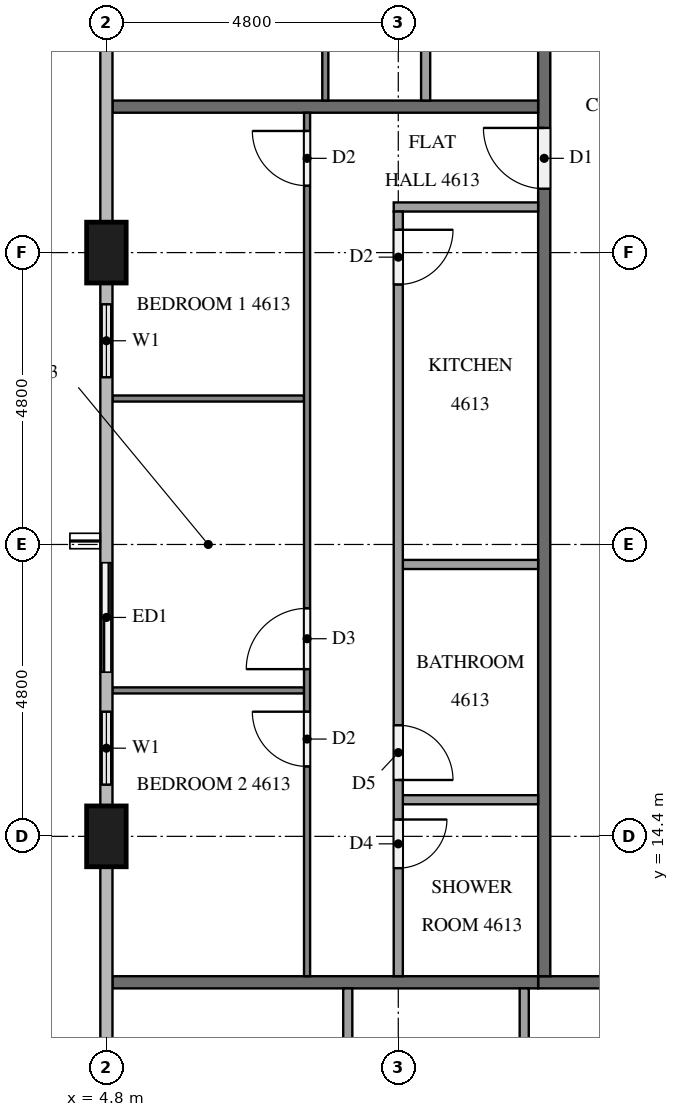
"""IFC4 building model, lengths in metres.
Left out: names, types, materials, properties, quantities, classifications, styles, units other than length and angle.
Written with IfcOpenShell. Run it as: python <this file> out.ifc"""

import sys

from ifc_helpers import new_model, si_unit, direction, frame, frame_2d, origin, origin_2d, place, context, subcontext, project, spatial, rectangle, extrude, element, fill, save


model = new_model("IFC4")
c1 = context("Model", 3, precision=1e-05, world=origin(), true_north=direction((0.0, 1.0)))
c2 = subcontext(c1, "Body", "Model", "MODEL_VIEW")
j1 = project(units=[si_unit("LENGTHUNIT", "METRE"), si_unit("PLANEANGLEUNIT", "RADIAN")], contexts=[c1])
p1 = place(None, origin())
s1 = spatial("IfcSite", under=j1, at=p1, CompositionType="ELEMENT")
p2 = place(p1, origin())
s2 = spatial("IfcBuilding", under=s1, at=p2, CompositionType="ELEMENT")
p3 = place(p2, frame((0.0, 0.0, 178.9)))
s3 = spatial("IfcBuildingStorey", under=s2, at=p3, CompositionType="ELEMENT", Elevation=178.9)
for number, where, z_axis, x_axis in (
    (1, (4.8, 24.0, 0.0), (0.0, 0.0, 1.0), (0.0, 1.0, 0.0)),
    (2, (4.8, 14.4, 0.0), (0.0, 0.0, 1.0), (0.0, 1.0, 0.0)),
):
    element("IfcColumn", number, at=place(p3, frame(where, z_axis=z_axis, x_axis=x_axis)), inside=s3, PredefinedType="COLUMN", context=c2, shape_type="SweptSolid", body=[
        extrude(rectangle(XDim=1.0, YDim=0.65, at=origin_2d()), origin(), (0.0, 0.0, 1.0), 3.2),
    ])
p4 = place(p3, frame((4.8, 23.5, 0.0), z_axis=(0.0, 0.0, 1.0), x_axis=(0.0, -1.0, 0.0)))
e3 = element("IfcWall", 3, at=p4, inside=s3, PredefinedType="SOLIDWALL", context=c2, shape_type="SweptSolid", body=[
    extrude(rectangle(XDim=1.9, YDim=0.15, at=frame_2d((0.95, 0.0))), origin(), (0.0, 0.0, 1.0), 3.2),
])
p5 = place(p4, frame((0.35, 0.0, 0.9)))
e4 = element("IfcOpeningElement", 4, at=p5, cuts=e3, PredefinedType="OPENING", context=c2, shape_type="SweptSolid", body=[
    extrude(rectangle(XDim=1.2, YDim=1.4, at=frame_2d((0.6, 0.7))), frame((0.0, 0.085, 0.0), z_axis=(0.0, -1.0, 0.0), x_axis=(1.0, 0.0, 0.0)), (0.0, 0.0, 1.0), 0.17),
])
p6 = place(p3, frame((4.8, 19.2, 0.0), z_axis=(0.0, 0.0, 1.0), x_axis=(0.0, -1.0, 0.0)))
e5 = element("IfcWall", 5, at=p6, inside=s3, PredefinedType="SOLIDWALL", context=c2, shape_type="SweptSolid", body=[
    extrude(rectangle(XDim=4.3, YDim=0.15, at=frame_2d((2.15, 0.0))), origin(), (0.0, 0.0, 1.0), 3.2),
])
p7 = place(p6, frame((0.3, 0.0, 0.0)))
e6 = element("IfcOpeningElement", 6, at=p7, cuts=e5, PredefinedType="OPENING", context=c2, shape_type="SweptSolid", body=[
    extrude(rectangle(XDim=1.8, YDim=2.4, at=frame_2d((0.9, 1.2))), frame((0.0, 0.085, 0.0), z_axis=(0.0, -1.0, 0.0), x_axis=(1.0, 0.0, 0.0)), (0.0, 0.0, 1.0), 0.17),
])
p8 = place(p6, frame((2.75, 0.0, 0.9)))
e7 = element("IfcOpeningElement", 7, at=p8, cuts=e5, PredefinedType="OPENING", context=c2, shape_type="SweptSolid", body=[
    extrude(rectangle(XDim=1.2, YDim=1.4, at=frame_2d((0.6, 0.7))), frame((0.0, 0.085, 0.0), z_axis=(0.0, -1.0, 0.0), x_axis=(1.0, 0.0, 0.0)), (0.0, 0.0, 1.0), 0.17),
])
p9 = place(p3, frame((50.5, 12.0, 0.0), z_axis=(0.0, 0.0, 1.0), x_axis=(-1.0, 0.0, 0.0)))
e8 = element("IfcWall", 8, at=p9, inside=s3, PredefinedType="PARTITIONING", context=c2, shape_type="SweptSolid", body=[
    extrude(rectangle(XDim=38.6, YDim=0.2, at=frame_2d((19.3, 0.0))), origin(), (0.0, 0.0, 1.0), 3.2),
])
p10 = place(p9, frame((31.65, 0.0, 0.0)))
e9 = element("IfcOpeningElement", 9, at=p10, cuts=e8, PredefinedType="OPENING", context=c2, shape_type="SweptSolid", body=[
    extrude(rectangle(XDim=1.0, YDim=2.1, at=frame_2d((0.5, 1.05))), frame((0.0, 0.11, 0.0), z_axis=(0.0, -1.0, 0.0), x_axis=(1.0, 0.0, 0.0)), (0.0, 0.0, 1.0), 0.22),
])
p11 = place(p9, frame((17.25, 0.0, 0.0)))
e10 = element("IfcOpeningElement", 10, at=p11, cuts=e8, PredefinedType="OPENING", context=c2, shape_type="SweptSolid", body=[
    extrude(rectangle(XDim=1.0, YDim=2.1, at=frame_2d((0.5, 1.05))), frame((0.0, 0.11, 0.0), z_axis=(0.0, -1.0, 0.0), x_axis=(1.0, 0.0, 0.0)), (0.0, 0.0, 1.0), 0.22),
])
p12 = place(p9, frame((7.65, 0.0, 0.0)))
e11 = element("IfcOpeningElement", 11, at=p12, cuts=e8, PredefinedType="OPENING", context=c2, shape_type="SweptSolid", body=[
    extrude(rectangle(XDim=1.0, YDim=2.1, at=frame_2d((0.5, 1.05))), frame((0.0, 0.11, 0.0), z_axis=(0.0, -1.0, 0.0), x_axis=(1.0, 0.0, 0.0)), (0.0, 0.0, 1.0), 0.22),
])
p13 = place(p9, frame((5.9, 0.0, 0.0)))
e12 = element("IfcOpeningElement", 12, at=p13, cuts=e8, PredefinedType="OPENING", context=c2, shape_type="SweptSolid", body=[
    extrude(rectangle(XDim=1.1, YDim=2.1, at=frame_2d((0.55, 1.05))), frame((0.0, 0.11, 0.0), z_axis=(0.0, -1.0, 0.0), x_axis=(1.0, 0.0, 0.0)), (0.0, 0.0, 1.0), 0.22),
])
p14 = place(p3, frame((12.0, 12.1, 0.0), z_axis=(0.0, 0.0, 1.0), x_axis=(0.0, 1.0, 0.0)))
e13 = element("IfcWall", 13, at=p14, inside=s3, PredefinedType="PARTITIONING", context=c2, shape_type="SweptSolid", body=[
    extrude(rectangle(XDim=28.6, YDim=0.2, at=frame_2d((14.3, 0.0))), origin(), (0.0, 0.0, 1.0), 3.2),
])
p15 = place(p14, frame((26.65, 0.0, 0.0)))
e14 = element("IfcOpeningElement", 14, at=p15, cuts=e13, PredefinedType="OPENING", context=c2, shape_type="SweptSolid", body=[
    extrude(rectangle(XDim=1.0, YDim=2.1, at=frame_2d((0.5, 1.05))), frame((0.0, 0.11, 0.0), z_axis=(0.0, -1.0, 0.0), x_axis=(1.0, 0.0, 0.0)), (0.0, 0.0, 1.0), 0.22),
])
p16 = place(p14, frame((24.95, 0.0, 0.0)))
e15 = element("IfcOpeningElement", 15, at=p16, cuts=e13, PredefinedType="OPENING", context=c2, shape_type="SweptSolid", body=[
    extrude(rectangle(XDim=1.0, YDim=2.1, at=frame_2d((0.5, 1.05))), frame((0.0, 0.11, 0.0), z_axis=(0.0, -1.0, 0.0), x_axis=(1.0, 0.0, 0.0)), (0.0, 0.0, 1.0), 0.22),
])
p17 = place(p14, frame((12.95, 0.0, 0.0)))
e16 = element("IfcOpeningElement", 16, at=p17, cuts=e13, PredefinedType="OPENING", context=c2, shape_type="SweptSolid", body=[
    extrude(rectangle(XDim=1.0, YDim=2.1, at=frame_2d((0.5, 1.05))), frame((0.0, 0.11, 0.0), z_axis=(0.0, -1.0, 0.0), x_axis=(1.0, 0.0, 0.0)), (0.0, 0.0, 1.0), 0.22),
])
for number, where, z_axis, x_axis in (
    (17, (4.9, 12.0, 0.0), (0.0, 0.0, 1.0), (1.0, 0.0, 0.0)),
    (18, (4.9, 26.4, 0.0), (0.0, 0.0, 1.0), (1.0, 0.0, 0.0)),
):
    element("IfcWall", number, at=place(p3, frame(where, z_axis=z_axis, x_axis=x_axis)), inside=s3, PredefinedType="PARTITIONING", context=c2, shape_type="SweptSolid", body=[
        extrude(rectangle(XDim=7.0, YDim=0.2, at=frame_2d((3.5, 0.0))), origin(), (0.0, 0.0, 1.0), 3.2),
    ])
for number, where, z_axis, x_axis in (
    (19, (11.671, 11.9, 0.0), (0.0, 0.0, 1.0), (0.0, -1.0, 0.0)),
    (20, (8.769, 11.9, 0.0), (0.0, 0.0, 1.0), (0.0, -1.0, 0.0)),
):
    element("IfcWall", number, at=place(p3, frame(where, z_axis=z_axis, x_axis=x_axis)), inside=s3, PredefinedType="PARTITIONING", context=c2, shape_type="SweptSolid", body=[
        extrude(rectangle(XDim=4.325, YDim=0.15, at=frame_2d((2.163, 0.0))), origin(), (0.0, 0.0, 1.0), 3.2),
    ])
p18 = place(p3, frame((8.4, 26.5, 0.0), z_axis=(0.0, 0.0, 1.0), x_axis=(0.0, 1.0, 0.0)))
e21 = element("IfcWall", 21, at=p18, inside=s3, PredefinedType="PARTITIONING", context=c2, shape_type="SweptSolid", body=[
    extrude(rectangle(XDim=11.8, YDim=0.1, at=frame_2d((5.9, 0.0))), origin(), (0.0, 0.0, 1.0), 3.2),
])
p19 = place(p18, frame((5.05, 0.0, 0.0)))
e22 = element("IfcOpeningElement", 22, at=p19, cuts=e21, PredefinedType="OPENING", context=c2, shape_type="SweptSolid", body=[
    extrude(rectangle(XDim=1.0, YDim=2.1, at=frame_2d((0.5, 1.05))), frame((0.0, 0.06, 0.0), z_axis=(0.0, -1.0, 0.0), x_axis=(1.0, 0.0, 0.0)), (0.0, 0.0, 1.0), 0.12),
])
p20 = place(p18, frame((3.45, 0.0, 0.0)))
e23 = element("IfcOpeningElement", 23, at=p20, cuts=e21, PredefinedType="OPENING", context=c2, shape_type="SweptSolid", body=[
    extrude(rectangle(XDim=0.9, YDim=2.1, at=frame_2d((0.45, 1.05))), frame((0.0, 0.06, 0.0), z_axis=(0.0, -1.0, 0.0), x_axis=(1.0, 0.0, 0.0)), (0.0, 0.0, 1.0), 0.12),
])
p21 = place(p3, frame((10.05, 36.675, 0.0), z_axis=(0.0, 0.0, 1.0), x_axis=(0.0, -1.0, 0.0)))
e24 = element("IfcWall", 24, at=p21, inside=s3, PredefinedType="PARTITIONING", context=c2, shape_type="SweptSolid", body=[
    extrude(rectangle(XDim=10.175, YDim=0.15, at=frame_2d((5.087, 0.0))), origin(), (0.0, 0.0, 1.0), 3.2),
])
p22 = place(p21, frame((4.88, 0.0, 0.0)))
e25 = element("IfcOpeningElement", 25, at=p22, cuts=e24, PredefinedType="OPENING", context=c2, shape_type="SweptSolid", body=[
    extrude(rectangle(XDim=0.9, YDim=2.1, at=frame_2d((0.45, 1.05))), frame((0.0, 0.085, 0.0), z_axis=(0.0, -1.0, 0.0), x_axis=(1.0, 0.0, 0.0)), (0.0, 0.0, 1.0), 0.17),
])
p23 = place(p21, frame((6.43, 0.0, 0.0)))
e26 = element("IfcOpeningElement", 26, at=p23, cuts=e24, PredefinedType="OPENING", context=c2, shape_type="SweptSolid", body=[
    extrude(rectangle(XDim=0.8, YDim=2.1, at=frame_2d((0.4, 1.05))), frame((0.0, 0.085, 0.0), z_axis=(0.0, -1.0, 0.0), x_axis=(1.0, 0.0, 0.0)), (0.0, 0.0, 1.0), 0.17),
])
for number, where, z_axis, x_axis in (
    (27, (8.05, 21.6, 0.0), (0.0, 0.0, 1.0), (-1.0, 0.0, 0.0)),
    (28, (8.05, 16.8, 0.0), (0.0, 0.0, 1.0), (-1.0, 0.0, 0.0)),
):
    element("IfcWall", number, at=place(p3, frame(where, z_axis=z_axis, x_axis=x_axis)), inside=s3, PredefinedType="PARTITIONING", context=c2, shape_type="SweptSolid", body=[
        extrude(rectangle(XDim=3.15, YDim=0.1, at=frame_2d((1.575, 0.0))), origin(), (0.0, 0.0, 1.0), 3.2),
    ])
p24 = place(p3, frame((8.1, 12.1, 0.0), z_axis=(0.0, 0.0, 1.0), x_axis=(0.0, 1.0, 0.0)))
e29 = element("IfcWall", 29, at=p24, inside=s3, PredefinedType="PARTITIONING", context=c2, shape_type="SweptSolid", body=[
    extrude(rectangle(XDim=14.2, YDim=0.1, at=frame_2d((7.1, 0.0))), origin(), (0.0, 0.0, 1.0), 3.2),
])
p25 = place(p24, frame((13.0, 0.0, 0.0)))
e30 = element("IfcOpeningElement", 30, at=p25, cuts=e29, PredefinedType="OPENING", context=c2, shape_type="SweptSolid", body=[
    extrude(rectangle(XDim=0.9, YDim=2.1, at=frame_2d((0.45, 1.05))), frame((0.0, 0.06, 0.0), z_axis=(0.0, -1.0, 0.0), x_axis=(1.0, 0.0, 0.0)), (0.0, 0.0, 1.0), 0.12),
])
p26 = place(p24, frame((5.05, 0.0, 0.0)))
e31 = element("IfcOpeningElement", 31, at=p26, cuts=e29, PredefinedType="OPENING", context=c2, shape_type="SweptSolid", body=[
    extrude(rectangle(XDim=1.0, YDim=2.1, at=frame_2d((0.5, 1.05))), frame((0.0, 0.06, 0.0), z_axis=(0.0, -1.0, 0.0), x_axis=(1.0, 0.0, 0.0)), (0.0, 0.0, 1.0), 0.12),
])
p27 = place(p24, frame((3.45, 0.0, 0.0)))
e32 = element("IfcOpeningElement", 32, at=p27, cuts=e29, PredefinedType="OPENING", context=c2, shape_type="SweptSolid", body=[
    extrude(rectangle(XDim=0.9, YDim=2.1, at=frame_2d((0.45, 1.05))), frame((0.0, 0.06, 0.0), z_axis=(0.0, -1.0, 0.0), x_axis=(1.0, 0.0, 0.0)), (0.0, 0.0, 1.0), 0.12),
])
for number, where, z_axis, x_axis in (
    (33, (11.9, 18.871, 0.0), (0.0, 0.0, 1.0), (-1.0, 0.0, 0.0)),
    (34, (11.9, 15.002, 0.0), (0.0, 0.0, 1.0), (-1.0, 0.0, 0.0)),
):
    element("IfcWall", number, at=place(p3, frame(where, z_axis=z_axis, x_axis=x_axis)), inside=s3, PredefinedType="PARTITIONING", context=c2, shape_type="SweptSolid", body=[
        extrude(rectangle(XDim=2.225, YDim=0.15, at=frame_2d((1.112, 0.0))), origin(), (0.0, 0.0, 1.0), 3.2),
    ])
p28 = place(p3, frame((11.9, 24.75, 0.0), z_axis=(0.0, 0.0, 1.0), x_axis=(-1.0, 0.0, 0.0)))
e35 = element("IfcWall", 35, at=p28, inside=s3, PredefinedType="PARTITIONING", context=c2, shape_type="SweptSolid", body=[
    extrude(rectangle(XDim=2.375, YDim=0.15, at=frame_2d((1.188, 0.0))), origin(), (0.0, 0.0, 1.0), 3.2),
])
p29 = place(p3, frame((9.6, 24.675, 0.0), z_axis=(0.0, 0.0, 1.0), x_axis=(0.0, -1.0, 0.0)))
e36 = element("IfcWall", 36, at=p29, inside=s3, PredefinedType="PARTITIONING", context=c2, shape_type="SweptSolid", body=[
    extrude(rectangle(XDim=12.575, YDim=0.15, at=frame_2d((6.288, 0.0))), origin(), (0.0, 0.0, 1.0), 3.2),
])
p30 = place(p29, frame((0.3, 0.0, 0.0)))
e37 = element("IfcOpeningElement", 37, at=p30, cuts=e36, PredefinedType="OPENING", context=c2, shape_type="SweptSolid", body=[
    extrude(rectangle(XDim=0.9, YDim=2.1, at=frame_2d((0.45, 1.05))), frame((0.0, 0.085, 0.0), z_axis=(0.0, -1.0, 0.0), x_axis=(1.0, 0.0, 0.0)), (0.0, 0.0, 1.0), 0.17),
])
p31 = place(p29, frame((8.448, 0.0, 0.0)))
e38 = element("IfcOpeningElement", 38, at=p31, cuts=e36, PredefinedType="OPENING", context=c2, shape_type="SweptSolid", body=[
    extrude(rectangle(XDim=0.9, YDim=2.1, at=frame_2d((0.45, 1.05))), frame((0.0, 0.085, 0.0), z_axis=(0.0, -1.0, 0.0), x_axis=(1.0, 0.0, 0.0)), (0.0, 0.0, 1.0), 0.17),
])
p32 = place(p29, frame((9.998, 0.0, 0.0)))
e39 = element("IfcOpeningElement", 39, at=p32, cuts=e36, PredefinedType="OPENING", context=c2, shape_type="SweptSolid", body=[
    extrude(rectangle(XDim=0.8, YDim=2.1, at=frame_2d((0.4, 1.05))), frame((0.0, 0.085, 0.0), z_axis=(0.0, -1.0, 0.0), x_axis=(1.0, 0.0, 0.0)), (0.0, 0.0, 1.0), 0.17),
])
p33 = place(p5, origin())
e40 = element("IfcWindow", 40, at=p33, inside=s3, PartitioningType="SINGLE_PANEL", PredefinedType="WINDOW", context=c2, shape_type="SweptSolid", body=[
    extrude(rectangle(XDim=1.2, YDim=1.4, at=frame_2d((0.6, 0.7))), frame((0.0, 0.03, 0.0), z_axis=(0.0, -1.0, 0.0), x_axis=(1.0, 0.0, 0.0)), (0.0, 0.0, 1.0), 0.06),
])
fill(e4, e40)
p34 = place(p7, origin())
e41 = element("IfcDoor", 41, at=p34, inside=s3, OperationType="SLIDING_TO_LEFT", PredefinedType="DOOR", context=c2, shape_type="SweptSolid", body=[
    extrude(rectangle(XDim=1.8, YDim=2.4, at=frame_2d((0.9, 1.2))), frame((0.0, 0.025, 0.0), z_axis=(0.0, -1.0, 0.0), x_axis=(1.0, 0.0, 0.0)), (0.0, 0.0, 1.0), 0.05),
])
fill(e6, e41)
p35 = place(p8, origin())
e42 = element("IfcWindow", 42, at=p35, inside=s3, PartitioningType="SINGLE_PANEL", PredefinedType="WINDOW", context=c2, shape_type="SweptSolid", body=[
    extrude(rectangle(XDim=1.2, YDim=1.4, at=frame_2d((0.6, 0.7))), frame((0.0, 0.03, 0.0), z_axis=(0.0, -1.0, 0.0), x_axis=(1.0, 0.0, 0.0)), (0.0, 0.0, 1.0), 0.06),
])
fill(e7, e42)
p36 = place(p17, origin())
e43 = element("IfcDoor", 43, at=p36, inside=s3, OperationType="SINGLE_SWING_RIGHT", PredefinedType="DOOR", context=c2, shape_type="SweptSolid", body=[
    extrude(rectangle(XDim=1.0, YDim=2.1, at=frame_2d((0.5, 1.05))), frame((0.0, 0.025, 0.0), z_axis=(0.0, -1.0, 0.0), x_axis=(1.0, 0.0, 0.0)), (0.0, 0.0, 1.0), 0.05),
])
fill(e16, e43)
p37 = place(p25, origin())
e44 = element("IfcDoor", 44, at=p37, inside=s3, OperationType="SINGLE_SWING_RIGHT", PredefinedType="DOOR", context=c2, shape_type="SweptSolid", body=[
    extrude(rectangle(XDim=0.9, YDim=2.1, at=frame_2d((0.45, 1.05))), frame((0.0, 0.025, 0.0), z_axis=(0.0, -1.0, 0.0), x_axis=(1.0, 0.0, 0.0)), (0.0, 0.0, 1.0), 0.05),
])
fill(e30, e44)
p38 = place(p26, origin())
e45 = element("IfcDoor", 45, at=p38, inside=s3, OperationType="SINGLE_SWING_LEFT", PredefinedType="DOOR", context=c2, shape_type="SweptSolid", body=[
    extrude(rectangle(XDim=1.0, YDim=2.1, at=frame_2d((0.5, 1.05))), frame((0.0, 0.025, 0.0), z_axis=(0.0, -1.0, 0.0), x_axis=(1.0, 0.0, 0.0)), (0.0, 0.0, 1.0), 0.05),
])
fill(e31, e45)
p39 = place(p27, origin())
e46 = element("IfcDoor", 46, at=p39, inside=s3, OperationType="SINGLE_SWING_RIGHT", PredefinedType="DOOR", context=c2, shape_type="SweptSolid", body=[
    extrude(rectangle(XDim=0.9, YDim=2.1, at=frame_2d((0.45, 1.05))), frame((0.0, 0.025, 0.0), z_axis=(0.0, -1.0, 0.0), x_axis=(1.0, 0.0, 0.0)), (0.0, 0.0, 1.0), 0.05),
])
fill(e32, e46)
p40 = place(p30, origin())
e47 = element("IfcDoor", 47, at=p40, inside=s3, OperationType="SINGLE_SWING_LEFT", PredefinedType="DOOR", context=c2, shape_type="SweptSolid", body=[
    extrude(rectangle(XDim=0.9, YDim=2.1, at=frame_2d((0.45, 1.05))), frame((0.0, 0.025, 0.0), z_axis=(0.0, -1.0, 0.0), x_axis=(1.0, 0.0, 0.0)), (0.0, 0.0, 1.0), 0.05),
])
fill(e37, e47)
p41 = place(p31, origin())
e48 = element("IfcDoor", 48, at=p41, inside=s3, OperationType="SINGLE_SWING_RIGHT", PredefinedType="DOOR", context=c2, shape_type="SweptSolid", body=[
    extrude(rectangle(XDim=0.9, YDim=2.1, at=frame_2d((0.45, 1.05))), frame((0.0, 0.025, 0.0), z_axis=(0.0, -1.0, 0.0), x_axis=(1.0, 0.0, 0.0)), (0.0, 0.0, 1.0), 0.05),
])
fill(e38, e48)
p42 = place(p32, origin())
e49 = element("IfcDoor", 49, at=p42, inside=s3, OperationType="SINGLE_SWING_LEFT", PredefinedType="DOOR", context=c2, shape_type="SweptSolid", body=[
    extrude(rectangle(XDim=0.8, YDim=2.1, at=frame_2d((0.4, 1.05))), frame((0.0, 0.025, 0.0), z_axis=(0.0, -1.0, 0.0), x_axis=(1.0, 0.0, 0.0)), (0.0, 0.0, 1.0), 0.05),
])
fill(e39, e49)
save(model, sys.argv[1])
